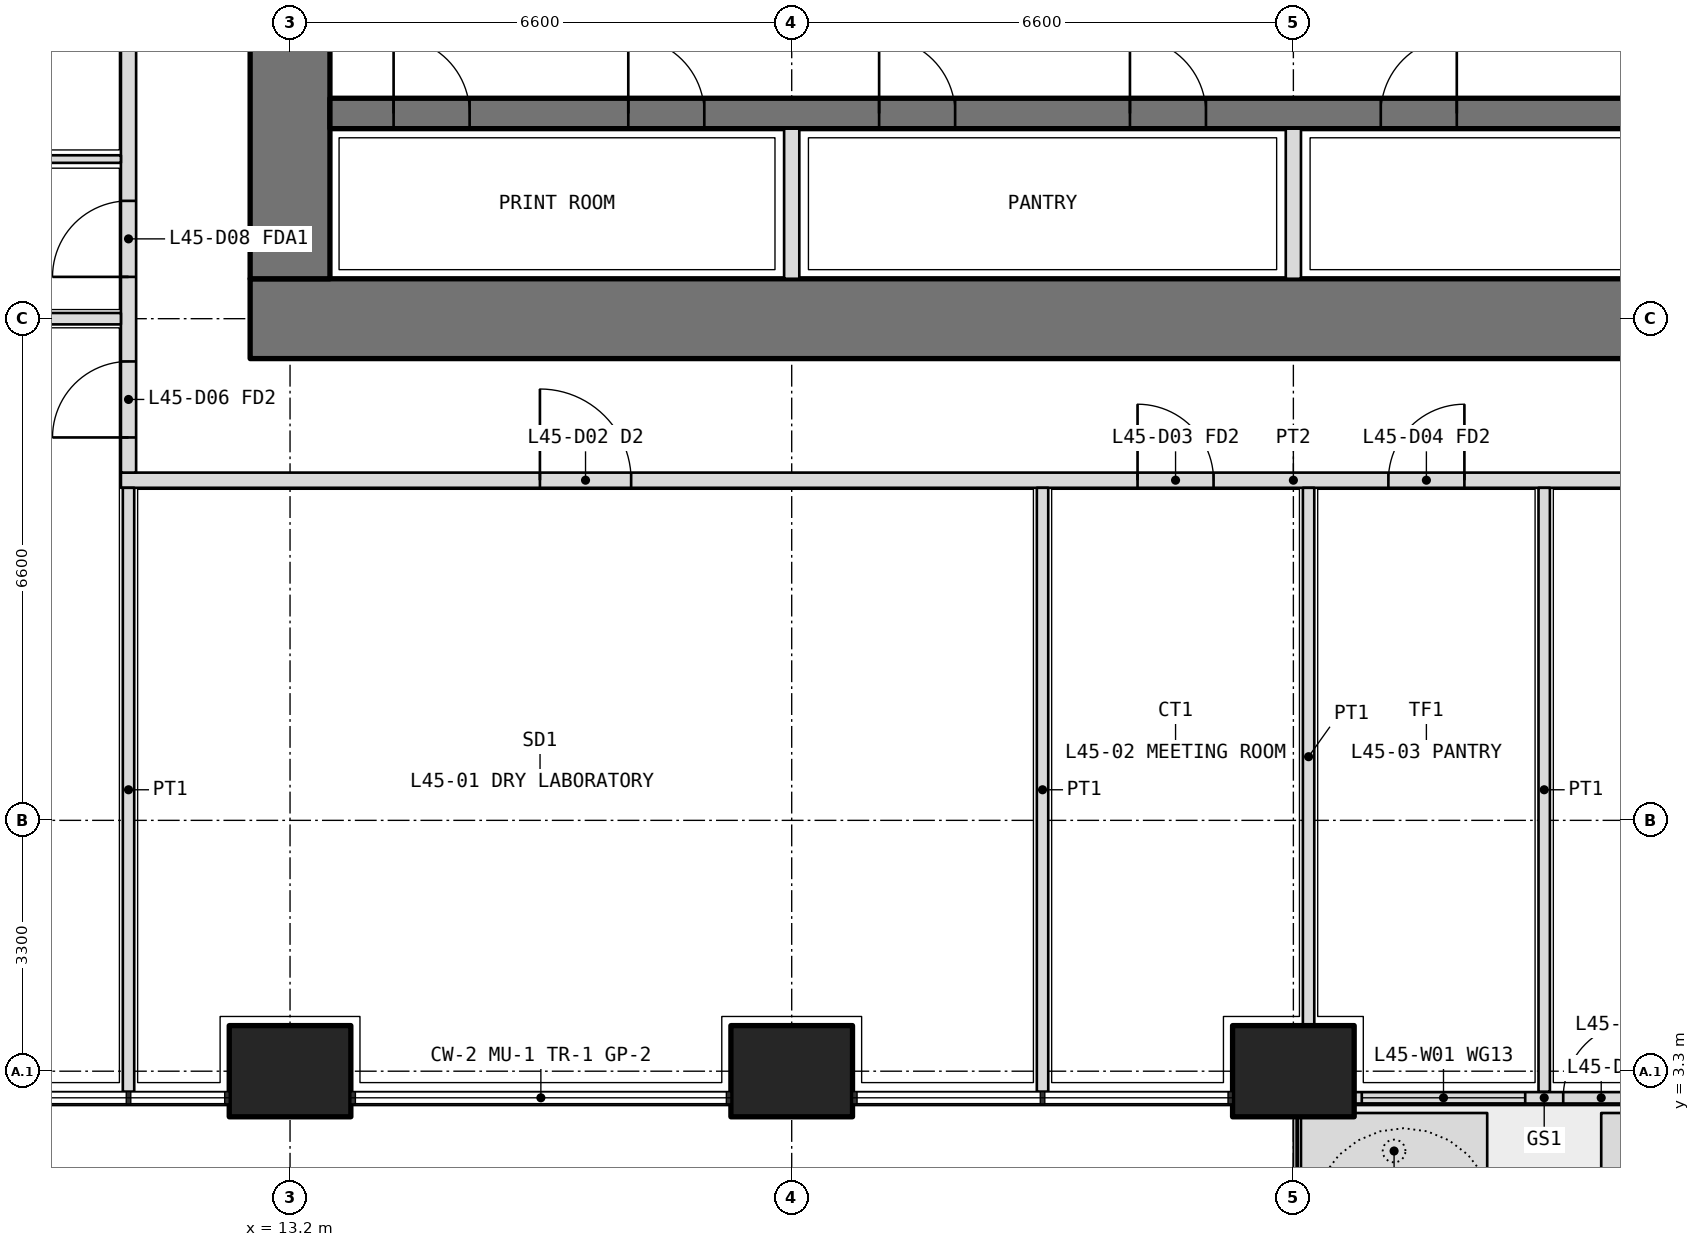
"""IFC4 building model, lengths in metres.
Left out: names, types, materials, properties, quantities, classifications, styles, units other than length and angle.
Written with IfcOpenShell. Run it as: python <this file> out.ifc"""

import sys

from ifc_helpers import new_model, si_unit, direction, frame, frame_2d, origin, origin_2d, place, context, subcontext, project, spatial, polyline, rectangle, outline, extrude, element, fill, save


model = new_model("IFC4")
c1 = context("Model", 3, precision=1e-05, world=origin(), true_north=direction((0.0, 1.0)))
c2 = subcontext(c1, "Body", "Model", "MODEL_VIEW")
j1 = project(units=[si_unit("LENGTHUNIT", "METRE"), si_unit("PLANEANGLEUNIT", "RADIAN")], contexts=[c1])
p1 = place(None, origin())
s1 = spatial("IfcSite", under=j1, at=p1, CompositionType="ELEMENT")
p2 = place(p1, origin())
s2 = spatial("IfcBuilding", under=s1, at=p2, CompositionType="ELEMENT")
p3 = place(p2, frame((0.0, 0.0, 197.7)))
s3 = spatial("IfcBuildingStorey", under=s2, at=p3, CompositionType="ELEMENT", Elevation=197.7)
for number, where, z_axis, x_axis in (
    (1, (13.2, 3.3, 0.0), (0.0, 0.0, 1.0), (1.0, 0.0, 0.0)),
    (2, (19.8, 3.3, 0.0), (0.0, 0.0, 1.0), (1.0, 0.0, 0.0)),
    (3, (26.4, 3.3, 0.0), (0.0, 0.0, 1.0), (1.0, 0.0, 0.0)),
):
    element("IfcColumn", number, at=place(p3, frame(where, z_axis=z_axis, x_axis=x_axis)), inside=s3, PredefinedType="COLUMN", context=c2, shape_type="SweptSolid", body=[
        extrude(rectangle(XDim=1.6, YDim=1.2, at=origin_2d()), origin(), (0.0, 0.0, 1.0), 4.2),
    ])
p4 = place(p3, origin())
e4 = element("IfcWall", 4, at=p4, inside=s3, PredefinedType="USERDEFINED", context=c2, shape_type="SweptSolid", body=[
    extrude(outline(polyline([(26.5, 1.75), (28.95, 1.75), (28.95, 2.75), (26.5, 2.75), (26.5, 1.75)]), holes=[polyline([(26.65, 1.9), (28.8, 1.9), (28.8, 2.6), (26.65, 2.6), (26.65, 1.9)])]), origin(), (0.0, 0.0, 1.0), 1.05),
])
p5 = place(p3, origin())
e5 = element("IfcWall", 5, at=p5, inside=s3, PredefinedType="USERDEFINED", context=c2, shape_type="SweptSolid", body=[
    extrude(outline(polyline([(30.45, 1.75), (39.5, 1.75), (39.5, 2.75), (30.45, 2.75), (30.45, 1.75)]), holes=[polyline([(30.6, 1.9), (39.35, 1.9), (39.35, 2.6), (30.6, 2.6), (30.6, 1.9)])]), origin(), (0.0, 0.0, 1.0), 1.05),
])
p6 = place(p3, frame((27.2, 2.95, 0.0), z_axis=(0.0, 0.0, 1.0), x_axis=(1.0, 0.0, 0.0)))
e6 = element("IfcWall", 6, at=p6, inside=s3, PredefinedType="SOLIDWALL", context=c2, shape_type="SweptSolid", body=[
    extrude(rectangle(XDim=5.0, YDim=0.15, at=frame_2d((2.5, 0.0))), origin(), (0.0, 0.0, 1.0), 2.7),
])
p7 = place(p6, frame((2.75, 0.0, 0.0)))
e7 = element("IfcOpeningElement", 7, at=p7, cuts=e6, PredefinedType="OPENING", context=c2, shape_type="SweptSolid", body=[
    extrude(rectangle(XDim=1.0, YDim=2.4, at=frame_2d((0.5, 1.2))), frame((0.0, 0.085, 0.0), z_axis=(0.0, -1.0, 0.0), x_axis=(1.0, 0.0, 0.0)), (0.0, 0.0, 1.0), 0.17),
])
p8 = place(p6, frame((0.1, 0.0, 0.1)))
e8 = element("IfcOpeningElement", 8, at=p8, cuts=e6, PredefinedType="OPENING", context=c2, shape_type="SweptSolid", body=[
    extrude(rectangle(XDim=2.15, YDim=2.3, at=frame_2d((1.075, 1.15))), frame((0.0, 0.085, 0.0), z_axis=(0.0, -1.0, 0.0), x_axis=(1.0, 0.0, 0.0)), (0.0, 0.0, 1.0), 0.17),
])
p9 = place(p6, frame((3.85, 0.0, 0.1)))
e9 = element("IfcOpeningElement", 9, at=p9, cuts=e6, PredefinedType="OPENING", context=c2, shape_type="SweptSolid", body=[
    extrude(rectangle(XDim=1.05, YDim=2.3, at=frame_2d((0.525, 1.15))), frame((0.0, 0.085, 0.0), z_axis=(0.0, -1.0, 0.0), x_axis=(1.0, 0.0, 0.0)), (0.0, 0.0, 1.0), 0.17),
])
p10 = place(p3, frame((12.675, 13.2, 0.0), z_axis=(0.0, 0.0, 1.0), x_axis=(1.0, 0.0, 0.0)))
e10 = element("IfcWall", 10, at=p10, inside=s3, PredefinedType="SHEAR", context=c2, shape_type="SweptSolid", body=[
    extrude(rectangle(XDim=27.45, YDim=1.05, at=frame_2d((13.725, 0.0))), origin(), (0.0, 0.0, 1.0), 4.2),
])
p11 = place(p3, frame((13.2, 32.475, 0.0), z_axis=(0.0, 0.0, 1.0), x_axis=(0.0, -1.0, 0.0)))
e11 = element("IfcWall", 11, at=p11, inside=s3, PredefinedType="SHEAR", context=c2, shape_type="SweptSolid", body=[
    extrude(rectangle(XDim=18.75, YDim=1.05, at=frame_2d((9.375, 0.0))), origin(), (0.0, 0.0, 1.0), 4.2),
])
p12 = place(p11, frame((14.125, 0.0, 0.0)))
e12 = element("IfcOpeningElement", 12, at=p12, cuts=e11, PredefinedType="OPENING", context=c2, shape_type="SweptSolid", body=[
    extrude(rectangle(XDim=1.6, YDim=2.1, at=frame_2d((0.8, 1.05))), frame((0.0, 0.535, 0.0), z_axis=(0.0, -1.0, 0.0), x_axis=(1.0, 0.0, 0.0)), (0.0, 0.0, 1.0), 1.07),
])
p13 = place(p11, frame((3.325, 0.0, 0.0)))
e13 = element("IfcOpeningElement", 13, at=p13, cuts=e11, PredefinedType="OPENING", context=c2, shape_type="SweptSolid", body=[
    extrude(rectangle(XDim=1.6, YDim=2.1, at=frame_2d((0.8, 1.05))), frame((0.0, 0.535, 0.0), z_axis=(0.0, -1.0, 0.0), x_axis=(1.0, 0.0, 0.0)), (0.0, 0.0, 1.0), 1.07),
])
p14 = place(p3, frame((13.725, 15.9, 0.0), z_axis=(0.0, 0.0, 1.0), x_axis=(1.0, 0.0, 0.0)))
e14 = element("IfcWall", 14, at=p14, inside=s3, PredefinedType="SHEAR", context=c2, shape_type="SweptSolid", body=[
    extrude(rectangle(XDim=25.35, YDim=0.4, at=frame_2d((12.675, 0.0))), origin(), (0.0, 0.0, 1.0), 4.2),
])
p15 = place(p14, frame((0.837, 0.0, 0.0)))
e15 = element("IfcOpeningElement", 15, at=p15, cuts=e14, PredefinedType="OPENING", context=c2, shape_type="SweptSolid", body=[
    extrude(rectangle(XDim=1.0, YDim=2.1, at=frame_2d((0.5, 1.05))), frame((0.0, 0.21, 0.0), z_axis=(0.0, -1.0, 0.0), x_axis=(1.0, 0.0, 0.0)), (0.0, 0.0, 1.0), 0.42),
])
p16 = place(p14, frame((3.925, 0.0, 0.0)))
e16 = element("IfcOpeningElement", 16, at=p16, cuts=e14, PredefinedType="OPENING", context=c2, shape_type="SweptSolid", body=[
    extrude(rectangle(XDim=1.0, YDim=2.1, at=frame_2d((0.5, 1.05))), frame((0.0, 0.21, 0.0), z_axis=(0.0, -1.0, 0.0), x_axis=(1.0, 0.0, 0.0)), (0.0, 0.0, 1.0), 0.42),
])
p17 = place(p14, frame((7.225, 0.0, 0.0)))
e17 = element("IfcOpeningElement", 17, at=p17, cuts=e14, PredefinedType="OPENING", context=c2, shape_type="SweptSolid", body=[
    extrude(rectangle(XDim=1.0, YDim=2.1, at=frame_2d((0.5, 1.05))), frame((0.0, 0.21, 0.0), z_axis=(0.0, -1.0, 0.0), x_axis=(1.0, 0.0, 0.0)), (0.0, 0.0, 1.0), 0.42),
])
p18 = place(p14, frame((10.525, 0.0, 0.0)))
e18 = element("IfcOpeningElement", 18, at=p18, cuts=e14, PredefinedType="OPENING", context=c2, shape_type="SweptSolid", body=[
    extrude(rectangle(XDim=1.0, YDim=2.1, at=frame_2d((0.5, 1.05))), frame((0.0, 0.21, 0.0), z_axis=(0.0, -1.0, 0.0), x_axis=(1.0, 0.0, 0.0)), (0.0, 0.0, 1.0), 0.42),
])
p19 = place(p14, frame((13.825, 0.0, 0.0)))
e19 = element("IfcOpeningElement", 19, at=p19, cuts=e14, PredefinedType="OPENING", context=c2, shape_type="SweptSolid", body=[
    extrude(rectangle(XDim=1.0, YDim=2.1, at=frame_2d((0.5, 1.05))), frame((0.0, 0.21, 0.0), z_axis=(0.0, -1.0, 0.0), x_axis=(1.0, 0.0, 0.0)), (0.0, 0.0, 1.0), 0.42),
])
p20 = place(p14, frame((17.125, 0.0, 0.0)))
e20 = element("IfcOpeningElement", 20, at=p20, cuts=e14, PredefinedType="OPENING", context=c2, shape_type="SweptSolid", body=[
    extrude(rectangle(XDim=1.0, YDim=2.1, at=frame_2d((0.5, 1.05))), frame((0.0, 0.21, 0.0), z_axis=(0.0, -1.0, 0.0), x_axis=(1.0, 0.0, 0.0)), (0.0, 0.0, 1.0), 0.42),
])
p21 = place(p14, frame((20.425, 0.0, 0.0)))
e21 = element("IfcOpeningElement", 21, at=p21, cuts=e14, PredefinedType="OPENING", context=c2, shape_type="SweptSolid", body=[
    extrude(rectangle(XDim=1.0, YDim=2.1, at=frame_2d((0.5, 1.05))), frame((0.0, 0.21, 0.0), z_axis=(0.0, -1.0, 0.0), x_axis=(1.0, 0.0, 0.0)), (0.0, 0.0, 1.0), 0.42),
])
p22 = place(p14, frame((23.512, 0.0, 0.0)))
e22 = element("IfcOpeningElement", 22, at=p22, cuts=e14, PredefinedType="OPENING", context=c2, shape_type="SweptSolid", body=[
    extrude(rectangle(XDim=1.0, YDim=2.1, at=frame_2d((0.5, 1.05))), frame((0.0, 0.21, 0.0), z_axis=(0.0, -1.0, 0.0), x_axis=(1.0, 0.0, 0.0)), (0.0, 0.0, 1.0), 0.42),
])
for number, where, z_axis, x_axis in (
    (23, (19.8, 13.725, 0.0), (0.0, 0.0, 1.0), (0.0, 1.0, 0.0)),
    (24, (26.4, 13.725, 0.0), (0.0, 0.0, 1.0), (0.0, 1.0, 0.0)),
):
    element("IfcWall", number, at=place(p3, frame(where, z_axis=z_axis, x_axis=x_axis)), inside=s3, PredefinedType="PARTITIONING", context=c2, shape_type="SweptSolid", body=[
        extrude(rectangle(XDim=1.975, YDim=0.2, at=frame_2d((0.987, 0.0))), origin(), (0.0, 0.0, 1.0), 4.2),
    ])
p23 = place(p3, frame((10.975, 11.075, 0.0), z_axis=(0.0, 0.0, 1.0), x_axis=(1.0, 0.0, 0.0)))
e25 = element("IfcWall", 25, at=p23, inside=s3, PredefinedType="PARTITIONING", context=c2, shape_type="SweptSolid", body=[
    extrude(rectangle(XDim=30.85, YDim=0.2, at=frame_2d((15.425, 0.0))), origin(), (0.0, 0.0, 1.0), 2.85),
])
p24 = place(p23, frame((5.512, 0.0, 0.0)))
e26 = element("IfcOpeningElement", 26, at=p24, cuts=e25, PredefinedType="OPENING", context=c2, shape_type="SweptSolid", body=[
    extrude(rectangle(XDim=1.2, YDim=2.1, at=frame_2d((0.6, 1.05))), frame((0.0, 0.11, 0.0), z_axis=(0.0, -1.0, 0.0), x_axis=(1.0, 0.0, 0.0)), (0.0, 0.0, 1.0), 0.22),
])
p25 = place(p23, frame((13.375, 0.0, 0.0)))
e27 = element("IfcOpeningElement", 27, at=p25, cuts=e25, PredefinedType="OPENING", context=c2, shape_type="SweptSolid", body=[
    extrude(rectangle(XDim=1.0, YDim=2.1, at=frame_2d((0.5, 1.05))), frame((0.0, 0.11, 0.0), z_axis=(0.0, -1.0, 0.0), x_axis=(1.0, 0.0, 0.0)), (0.0, 0.0, 1.0), 0.22),
])
p26 = place(p23, frame((16.675, 0.0, 0.0)))
e28 = element("IfcOpeningElement", 28, at=p26, cuts=e25, PredefinedType="OPENING", context=c2, shape_type="SweptSolid", body=[
    extrude(rectangle(XDim=1.0, YDim=2.1, at=frame_2d((0.5, 1.05))), frame((0.0, 0.11, 0.0), z_axis=(0.0, -1.0, 0.0), x_axis=(1.0, 0.0, 0.0)), (0.0, 0.0, 1.0), 0.22),
])
p27 = place(p23, frame((24.238, 0.0, 0.0)))
e29 = element("IfcOpeningElement", 29, at=p27, cuts=e25, PredefinedType="OPENING", context=c2, shape_type="SweptSolid", body=[
    extrude(rectangle(XDim=1.0, YDim=2.1, at=frame_2d((0.5, 1.05))), frame((0.0, 0.11, 0.0), z_axis=(0.0, -1.0, 0.0), x_axis=(1.0, 0.0, 0.0)), (0.0, 0.0, 1.0), 0.22),
])
p28 = place(p3, frame((11.075, 11.175, 0.0), z_axis=(0.0, 0.0, 1.0), x_axis=(0.0, 1.0, 0.0)))
e30 = element("IfcWall", 30, at=p28, inside=s3, PredefinedType="PARTITIONING", context=c2, shape_type="SweptSolid", body=[
    extrude(rectangle(XDim=23.85, YDim=0.2, at=frame_2d((11.925, 0.0))), origin(), (0.0, 0.0, 1.0), 2.85),
])
p29 = place(p28, frame((0.462, 0.0, 0.0)))
e31 = element("IfcOpeningElement", 31, at=p29, cuts=e30, PredefinedType="OPENING", context=c2, shape_type="SweptSolid", body=[
    extrude(rectangle(XDim=1.0, YDim=2.1, at=frame_2d((0.5, 1.05))), frame((0.0, 0.11, 0.0), z_axis=(0.0, -1.0, 0.0), x_axis=(1.0, 0.0, 0.0)), (0.0, 0.0, 1.0), 0.22),
])
p30 = place(p28, frame((2.575, 0.0, 0.0)))
e32 = element("IfcOpeningElement", 32, at=p30, cuts=e30, PredefinedType="OPENING", context=c2, shape_type="SweptSolid", body=[
    extrude(rectangle(XDim=1.0, YDim=2.1, at=frame_2d((0.5, 1.05))), frame((0.0, 0.11, 0.0), z_axis=(0.0, -1.0, 0.0), x_axis=(1.0, 0.0, 0.0)), (0.0, 0.0, 1.0), 0.22),
])
p31 = place(p28, frame((5.625, 0.0, 0.0)))
e33 = element("IfcOpeningElement", 33, at=p31, cuts=e30, PredefinedType="OPENING", context=c2, shape_type="SweptSolid", body=[
    extrude(rectangle(XDim=0.9, YDim=2.1, at=frame_2d((0.45, 1.05))), frame((0.0, 0.11, 0.0), z_axis=(0.0, -1.0, 0.0), x_axis=(1.0, 0.0, 0.0)), (0.0, 0.0, 1.0), 0.22),
])
p32 = place(p28, frame((9.425, 0.0, 0.0)))
e34 = element("IfcOpeningElement", 34, at=p32, cuts=e30, PredefinedType="OPENING", context=c2, shape_type="SweptSolid", body=[
    extrude(rectangle(XDim=0.9, YDim=2.1, at=frame_2d((0.45, 1.05))), frame((0.0, 0.11, 0.0), z_axis=(0.0, -1.0, 0.0), x_axis=(1.0, 0.0, 0.0)), (0.0, 0.0, 1.0), 0.22),
])
p33 = place(p28, frame((12.975, 0.0, 0.0)))
e35 = element("IfcOpeningElement", 35, at=p33, cuts=e30, PredefinedType="OPENING", context=c2, shape_type="SweptSolid", body=[
    extrude(rectangle(XDim=1.0, YDim=2.1, at=frame_2d((0.5, 1.05))), frame((0.0, 0.11, 0.0), z_axis=(0.0, -1.0, 0.0), x_axis=(1.0, 0.0, 0.0)), (0.0, 0.0, 1.0), 0.22),
])
p34 = place(p28, frame((17.925, 0.0, 0.0)))
e36 = element("IfcOpeningElement", 36, at=p34, cuts=e30, PredefinedType="OPENING", context=c2, shape_type="SweptSolid", body=[
    extrude(rectangle(XDim=1.2, YDim=2.1, at=frame_2d((0.6, 1.05))), frame((0.0, 0.11, 0.0), z_axis=(0.0, -1.0, 0.0), x_axis=(1.0, 0.0, 0.0)), (0.0, 0.0, 1.0), 0.22),
])
p35 = place(p28, frame((22.288, 0.0, 0.0)))
e37 = element("IfcOpeningElement", 37, at=p35, cuts=e30, PredefinedType="OPENING", context=c2, shape_type="SweptSolid", body=[
    extrude(rectangle(XDim=1.2, YDim=2.1, at=frame_2d((0.6, 1.05))), frame((0.0, 0.11, 0.0), z_axis=(0.0, -1.0, 0.0), x_axis=(1.0, 0.0, 0.0)), (0.0, 0.0, 1.0), 0.22),
])
p36 = place(p3, frame((11.075, 3.03, 0.0), z_axis=(0.0, 0.0, 1.0), x_axis=(0.0, 1.0, 0.0)))
e38 = element("IfcWall", 38, at=p36, inside=s3, PredefinedType="PARTITIONING", context=c2, shape_type="SweptSolid", body=[
    extrude(rectangle(XDim=7.945, YDim=0.15, at=frame_2d((3.973, 0.0))), origin(), (0.0, 0.0, 1.0), 2.7),
])
p37 = place(p3, frame((26.6, 3.9, 0.0), z_axis=(0.0, 0.0, 1.0), x_axis=(0.0, 1.0, 0.0)))
e39 = element("IfcWall", 39, at=p37, inside=s3, PredefinedType="PARTITIONING", context=c2, shape_type="SweptSolid", body=[
    extrude(rectangle(XDim=7.075, YDim=0.15, at=frame_2d((3.538, 0.0))), origin(), (0.0, 0.0, 1.0), 2.85),
])
for number, where, z_axis, x_axis in (
    (40, (29.7, 3.03, 0.0), (0.0, 0.0, 1.0), (0.0, 1.0, 0.0)),
    (41, (23.1, 3.03, 0.0), (0.0, 0.0, 1.0), (0.0, 1.0, 0.0)),
):
    element("IfcWall", number, at=place(p3, frame(where, z_axis=z_axis, x_axis=x_axis)), inside=s3, PredefinedType="PARTITIONING", context=c2, shape_type="SweptSolid", body=[
        extrude(rectangle(XDim=7.945, YDim=0.15, at=frame_2d((3.973, 0.0))), origin(), (0.0, 0.0, 1.0), 2.7),
    ])
p38 = place(p3, frame((3.03, 15.3, 0.0), z_axis=(0.0, 0.0, 1.0), x_axis=(1.0, 0.0, 0.0)))
e42 = element("IfcWall", 42, at=p38, inside=s3, PredefinedType="PARTITIONING", context=c2, shape_type="SweptSolid", body=[
    extrude(rectangle(XDim=7.945, YDim=0.1, at=frame_2d((3.973, 0.0))), origin(), (0.0, 0.0, 1.0), 2.7),
])
p39 = place(p3, frame((7.2, 13.2, 0.0), z_axis=(0.0, 0.0, 1.0), x_axis=(1.0, 0.0, 0.0)))
e43 = element("IfcWall", 43, at=p39, inside=s3, PredefinedType="PARTITIONING", context=c2, shape_type="SweptSolid", body=[
    extrude(rectangle(XDim=3.775, YDim=0.15, at=frame_2d((1.888, 0.0))), origin(), (0.0, 0.0, 1.0), 2.85),
])
p40 = place(p7, origin())
e44 = element("IfcDoor", 44, at=p40, inside=s3, OperationType="SINGLE_SWING_RIGHT", PredefinedType="DOOR", context=c2, shape_type="SweptSolid", body=[
    extrude(rectangle(XDim=1.0, YDim=2.4, at=frame_2d((0.5, 1.2))), frame((0.0, 0.025, 0.0), z_axis=(0.0, -1.0, 0.0), x_axis=(1.0, 0.0, 0.0)), (0.0, 0.0, 1.0), 0.05),
])
fill(e7, e44)
p41 = place(p8, origin())
e45 = element("IfcWindow", 45, at=p41, inside=s3, PartitioningType="SINGLE_PANEL", PredefinedType="WINDOW", context=c2, shape_type="SweptSolid", body=[
    extrude(rectangle(XDim=2.15, YDim=2.3, at=frame_2d((1.075, 1.15))), frame((0.0, 0.03, 0.0), z_axis=(0.0, -1.0, 0.0), x_axis=(1.0, 0.0, 0.0)), (0.0, 0.0, 1.0), 0.06),
])
fill(e8, e45)
p42 = place(p24, origin())
e46 = element("IfcDoor", 46, at=p42, inside=s3, OperationType="DOUBLE_DOOR_SINGLE_SWING", PredefinedType="DOOR", context=c2, shape_type="SweptSolid", body=[
    extrude(rectangle(XDim=1.2, YDim=2.1, at=frame_2d((0.6, 1.05))), frame((0.0, 0.025, 0.0), z_axis=(0.0, -1.0, 0.0), x_axis=(1.0, 0.0, 0.0)), (0.0, 0.0, 1.0), 0.05),
])
fill(e26, e46)
p43 = place(p25, origin())
e47 = element("IfcDoor", 47, at=p43, inside=s3, OperationType="SINGLE_SWING_LEFT", PredefinedType="DOOR", context=c2, shape_type="SweptSolid", body=[
    extrude(rectangle(XDim=1.0, YDim=2.1, at=frame_2d((0.5, 1.05))), frame((0.0, 0.025, 0.0), z_axis=(0.0, -1.0, 0.0), x_axis=(1.0, 0.0, 0.0)), (0.0, 0.0, 1.0), 0.05),
])
fill(e27, e47)
p44 = place(p26, origin())
e48 = element("IfcDoor", 48, at=p44, inside=s3, OperationType="SINGLE_SWING_RIGHT", PredefinedType="DOOR", context=c2, shape_type="SweptSolid", body=[
    extrude(rectangle(XDim=1.0, YDim=2.1, at=frame_2d((0.5, 1.05))), frame((0.0, 0.025, 0.0), z_axis=(0.0, -1.0, 0.0), x_axis=(1.0, 0.0, 0.0)), (0.0, 0.0, 1.0), 0.05),
])
fill(e28, e48)
p45 = place(p29, origin())
e49 = element("IfcDoor", 49, at=p45, inside=s3, OperationType="SINGLE_SWING_LEFT", PredefinedType="DOOR", context=c2, shape_type="SweptSolid", body=[
    extrude(rectangle(XDim=1.0, YDim=2.1, at=frame_2d((0.5, 1.05))), frame((0.0, 0.025, 0.0), z_axis=(0.0, -1.0, 0.0), x_axis=(1.0, 0.0, 0.0)), (0.0, 0.0, 1.0), 0.05),
])
fill(e31, e49)
p46 = place(p30, origin())
e50 = element("IfcDoor", 50, at=p46, inside=s3, OperationType="SINGLE_SWING_LEFT", PredefinedType="DOOR", context=c2, shape_type="SweptSolid", body=[
    extrude(rectangle(XDim=1.0, YDim=2.1, at=frame_2d((0.5, 1.05))), frame((0.0, 0.025, 0.0), z_axis=(0.0, -1.0, 0.0), x_axis=(1.0, 0.0, 0.0)), (0.0, 0.0, 1.0), 0.05),
])
fill(e32, e50)
p47 = place(p15, origin())
e51 = element("IfcDoor", 51, at=p47, inside=s3, OperationType="SINGLE_SWING_LEFT", PredefinedType="DOOR", context=c2, shape_type="SweptSolid", body=[
    extrude(rectangle(XDim=1.0, YDim=2.1, at=frame_2d((0.5, 1.05))), frame((0.0, 0.025, 0.0), z_axis=(0.0, -1.0, 0.0), x_axis=(1.0, 0.0, 0.0)), (0.0, 0.0, 1.0), 0.05),
])
fill(e15, e51)
p48 = place(p16, origin())
e52 = element("IfcDoor", 52, at=p48, inside=s3, OperationType="SINGLE_SWING_LEFT", PredefinedType="DOOR", context=c2, shape_type="SweptSolid", body=[
    extrude(rectangle(XDim=1.0, YDim=2.1, at=frame_2d((0.5, 1.05))), frame((0.0, 0.025, 0.0), z_axis=(0.0, -1.0, 0.0), x_axis=(1.0, 0.0, 0.0)), (0.0, 0.0, 1.0), 0.05),
])
fill(e16, e52)
p49 = place(p17, origin())
e53 = element("IfcDoor", 53, at=p49, inside=s3, OperationType="SINGLE_SWING_LEFT", PredefinedType="DOOR", context=c2, shape_type="SweptSolid", body=[
    extrude(rectangle(XDim=1.0, YDim=2.1, at=frame_2d((0.5, 1.05))), frame((0.0, 0.025, 0.0), z_axis=(0.0, -1.0, 0.0), x_axis=(1.0, 0.0, 0.0)), (0.0, 0.0, 1.0), 0.05),
])
fill(e17, e53)
p50 = place(p18, origin())
e54 = element("IfcDoor", 54, at=p50, inside=s3, OperationType="SINGLE_SWING_LEFT", PredefinedType="DOOR", context=c2, shape_type="SweptSolid", body=[
    extrude(rectangle(XDim=1.0, YDim=2.1, at=frame_2d((0.5, 1.05))), frame((0.0, 0.025, 0.0), z_axis=(0.0, -1.0, 0.0), x_axis=(1.0, 0.0, 0.0)), (0.0, 0.0, 1.0), 0.05),
])
fill(e18, e54)
p51 = place(p19, origin())
e55 = element("IfcDoor", 55, at=p51, inside=s3, OperationType="SINGLE_SWING_RIGHT", PredefinedType="DOOR", context=c2, shape_type="SweptSolid", body=[
    extrude(rectangle(XDim=1.0, YDim=2.1, at=frame_2d((0.5, 1.05))), frame((0.0, 0.025, 0.0), z_axis=(0.0, -1.0, 0.0), x_axis=(1.0, 0.0, 0.0)), (0.0, 0.0, 1.0), 0.05),
])
fill(e19, e55)
save(model, sys.argv[1])
